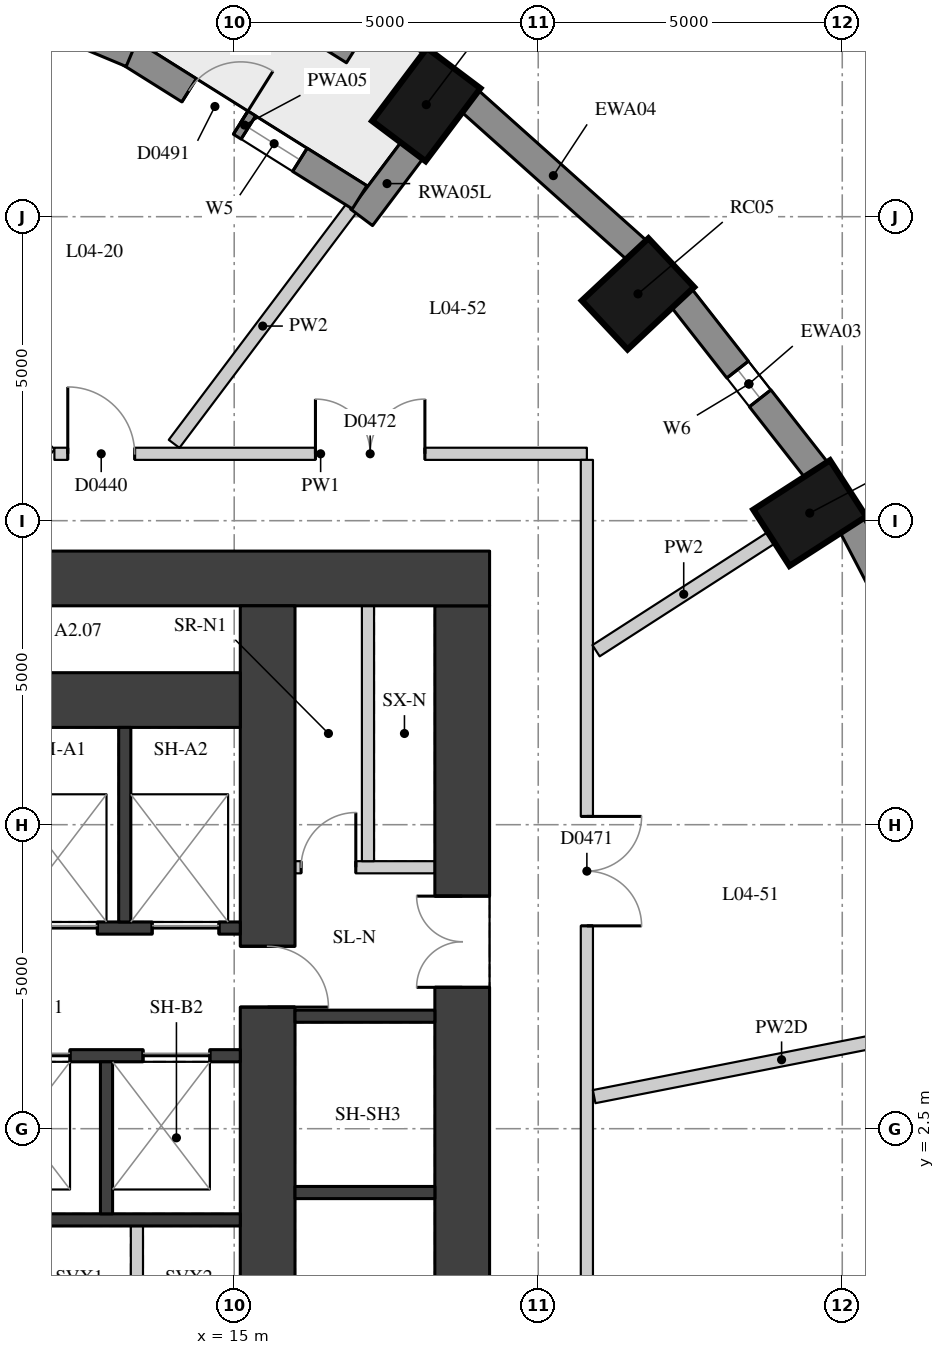
"""IFC4 building model, lengths in metres.
Left out: names, types, materials, properties, quantities, classifications, styles, units other than length and angle.
Written with IfcOpenShell. Run it as: python <this file> out.ifc"""

import sys

from ifc_helpers import new_model, si_unit, direction, frame, frame_2d, origin, origin_2d, place, context, subcontext, project, spatial, rectangle, extrude, element, fill, save


model = new_model("IFC4")
c1 = context("Model", 3, precision=1e-05, world=origin(), true_north=direction((0.0, 1.0)))
c2 = subcontext(c1, "Body", "Model", "MODEL_VIEW")
j1 = project(units=[si_unit("LENGTHUNIT", "METRE"), si_unit("PLANEANGLEUNIT", "RADIAN")], contexts=[c1])
p1 = place(None, origin())
s1 = spatial("IfcSite", under=j1, at=p1, CompositionType="ELEMENT")
p2 = place(p1, origin())
s2 = spatial("IfcBuilding", under=s1, at=p2, CompositionType="ELEMENT")
p3 = place(p2, frame((0.0, 0.0, 21.7)))
s3 = spatial("IfcBuildingStorey", under=s2, at=p3, CompositionType="ELEMENT", Elevation=21.7)
for number, where, z_axis, x_axis in (
    (1, (24.465, 12.625, 0.0), (0.0, 0.0, 1.0), (0.841, 0.541, 0.0)),
    (2, (21.641, 16.23, 0.0), (0.0, 0.0, 1.0), (0.73, 0.683, 0.0)),
    (3, (18.159, 19.343, 0.0), (0.0, 0.0, 1.0), (0.601, 0.799, 0.0)),
):
    element("IfcColumn", number, at=place(p3, frame(where, z_axis=z_axis, x_axis=x_axis)), inside=s3, PredefinedType="COLUMN", context=c2, shape_type="SweptSolid", body=[
        extrude(rectangle(XDim=1.5, YDim=1.1, at=origin_2d()), origin(), (0.0, 0.0, 1.0), 3.3),
    ])
p4 = place(p3, frame((26.786, 9.305, 0.0), z_axis=(0.0, 0.0, 1.0), x_axis=(-0.462492775226, 0.886623050041, 0.0)))
e4 = element("IfcWall", 4, at=p4, inside=s3, PredefinedType="SOLIDWALL", context=c2, shape_type="SweptSolid", body=[
    extrude(rectangle(XDim=3.532, YDim=0.45, at=frame_2d((1.766, 0.0))), origin(), (0.0, 0.0, 1.0), 3.02),
])
p5 = place(p3, frame((24.578, 13.328, 0.0), z_axis=(0.0, 0.0, 1.0), x_axis=(-0.616661975264, 0.787228053529, 0.0)))
e5 = element("IfcWall", 5, at=p5, inside=s3, PredefinedType="SOLIDWALL", context=c2, shape_type="SweptSolid", body=[
    extrude(rectangle(XDim=3.61, YDim=0.45, at=frame_2d((1.805, 0.0))), origin(), (0.0, 0.0, 1.0), 3.02),
])
p6 = place(p5, frame((1.505, 0.0, 0.4)))
e6 = element("IfcOpeningElement", 6, at=p6, cuts=e5, PredefinedType="OPENING", context=c2, shape_type="SweptSolid", body=[
    extrude(rectangle(XDim=0.6, YDim=1.75, at=frame_2d((0.3, 0.875))), frame((0.0, 0.235, 0.0), z_axis=(0.0, -1.0, 0.0), x_axis=(1.0, 0.0, 0.0)), (0.0, 0.0, 1.0), 0.47),
])
p7 = place(p3, frame((21.627, 16.943, 0.0), z_axis=(0.0, 0.0, 1.0), x_axis=(-0.745526233716, 0.66647628228, 0.0)))
e7 = element("IfcWall", 7, at=p7, inside=s3, PredefinedType="SOLIDWALL", context=c2, shape_type="SweptSolid", body=[
    extrude(rectangle(XDim=3.697, YDim=0.45, at=frame_2d((1.848, 0.0))), origin(), (0.0, 0.0, 1.0), 3.02),
])
p8 = place(p3, frame((17.932, 18.6, 0.0), z_axis=(0.0, 0.0, 1.0), x_axis=(-0.601262851241, -0.799051302306, 0.0)))
e8 = element("IfcWall", 8, at=p8, inside=s3, PredefinedType="SOLIDWALL", context=c2, shape_type="SweptSolid", body=[
    extrude(rectangle(XDim=1.391, YDim=0.45, at=frame_2d((0.696, 0.0))), origin(), (0.0, 0.0, 1.0), 3.02),
])
p9 = place(p3, frame((17.062, 17.819, 0.0), z_axis=(0.0, 0.0, 1.0), x_axis=(-0.846990101364, 0.531608660757, 0.0)))
e9 = element("IfcWall", 9, at=p9, inside=s3, PredefinedType="SOLIDWALL", context=c2, shape_type="SweptSolid", body=[
    extrude(rectangle(XDim=4.469, YDim=0.45, at=frame_2d((2.234, 0.0))), origin(), (0.0, 0.0, 1.0), 3.02),
])
p10 = place(p9, frame((1.159, 0.0, 0.4)))
e10 = element("IfcOpeningElement", 10, at=p10, cuts=e9, PredefinedType="OPENING", context=c2, shape_type="SweptSolid", body=[
    extrude(rectangle(XDim=1.0, YDim=1.75, at=frame_2d((0.5, 0.875))), frame((0.0, 0.235, 0.0), z_axis=(0.0, -1.0, 0.0), x_axis=(1.0, 0.0, 0.0)), (0.0, 0.0, 1.0), 0.47),
])
p11 = place(p9, frame((2.31, 0.0, 0.0)))
e11 = element("IfcOpeningElement", 11, at=p11, cuts=e9, PredefinedType="OPENING", context=c2, shape_type="SweptSolid", body=[
    extrude(rectangle(XDim=1.0, YDim=2.15, at=frame_2d((0.5, 1.075))), frame((0.0, 0.235, 0.0), z_axis=(0.0, -1.0, 0.0), x_axis=(1.0, 0.0, 0.0)), (0.0, 0.0, 1.0), 0.47),
])
p12 = place(p3, frame((13.31, 20.178, 0.0), z_axis=(0.0, 0.0, 1.0), x_axis=(-0.922634412489, 0.385675693935, 0.0)))
e12 = element("IfcWall", 12, at=p12, inside=s3, PredefinedType="SOLIDWALL", context=c2, shape_type="SweptSolid", body=[
    extrude(rectangle(XDim=4.577, YDim=0.45, at=frame_2d((2.288, 0.0))), origin(), (0.0, 0.0, 1.0), 3.02),
])
p13 = place(p12, frame((1.213, 0.0, 0.4)))
e13 = element("IfcOpeningElement", 13, at=p13, cuts=e12, PredefinedType="OPENING", context=c2, shape_type="SweptSolid", body=[
    extrude(rectangle(XDim=1.0, YDim=1.75, at=frame_2d((0.5, 0.875))), frame((0.0, 0.235, 0.0), z_axis=(0.0, -1.0, 0.0), x_axis=(1.0, 0.0, 0.0)), (0.0, 0.0, 1.0), 0.47),
])
p14 = place(p12, frame((2.363, 0.0, 0.0)))
e14 = element("IfcOpeningElement", 14, at=p14, cuts=e12, PredefinedType="OPENING", context=c2, shape_type="SweptSolid", body=[
    extrude(rectangle(XDim=1.0, YDim=2.15, at=frame_2d((0.5, 1.075))), frame((0.0, 0.235, 0.0), z_axis=(0.0, -1.0, 0.0), x_axis=(1.0, 0.0, 0.0)), (0.0, 0.0, 1.0), 0.47),
])
p15 = place(p3, frame((17.032, 20.328, 0.0), z_axis=(0.0, 0.0, 1.0), x_axis=(-0.847609446823, 0.530620604252, 0.0)))
e15 = element("IfcWall", 15, at=p15, inside=s3, PredefinedType="USERDEFINED", context=c2, shape_type="SweptSolid", body=[
    extrude(rectangle(XDim=1.8, YDim=0.7, at=frame_2d((0.9, 0.0))), origin(), (0.0, 0.0, 1.0), 0.75),
])
p16 = place(p3, frame((18.75, -11.1, 0.0), z_axis=(0.0, 0.0, 1.0), x_axis=(0.0, 1.0, 0.0)))
e16 = element("IfcWall", 16, at=p16, inside=s3, PredefinedType="SHEAR", context=c2, shape_type="SweptSolid", body=[
    extrude(rectangle(XDim=22.2, YDim=0.9, at=frame_2d((11.1, 0.0))), origin(), (0.0, 0.0, 1.0), 3.02),
])
p17 = place(p16, frame((15.925, 0.0, 0.0)))
e17 = element("IfcOpeningElement", 17, at=p17, cuts=e16, PredefinedType="OPENING", context=c2, shape_type="SweptSolid", body=[
    extrude(rectangle(XDim=1.5, YDim=2.1, at=frame_2d((0.75, 1.05))), frame((0.0, 0.46, 0.0), z_axis=(0.0, -1.0, 0.0), x_axis=(1.0, 0.0, 0.0)), (0.0, 0.0, 1.0), 0.92),
])
p18 = place(p16, frame((4.525, 0.0, 0.0)))
e18 = element("IfcOpeningElement", 18, at=p18, cuts=e16, PredefinedType="OPENING", context=c2, shape_type="SweptSolid", body=[
    extrude(rectangle(XDim=1.5, YDim=2.1, at=frame_2d((0.75, 1.05))), frame((0.0, 0.46, 0.0), z_axis=(0.0, -1.0, 0.0), x_axis=(1.0, 0.0, 0.0)), (0.0, 0.0, 1.0), 0.92),
])
p19 = place(p3, frame((4.0, 11.55, 0.0), z_axis=(0.0, 0.0, 1.0), x_axis=(1.0, 0.0, 0.0)))
e19 = element("IfcWall", 19, at=p19, inside=s3, PredefinedType="SHEAR", context=c2, shape_type="SweptSolid", body=[
    extrude(rectangle(XDim=15.2, YDim=0.9, at=frame_2d((7.6, 0.0))), origin(), (0.0, 0.0, 1.0), 3.02),
])
p20 = place(p3, frame((15.55, -11.1, 0.0), z_axis=(0.0, 0.0, 1.0), x_axis=(0.0, 1.0, 0.0)))
e20 = element("IfcWall", 20, at=p20, inside=s3, PredefinedType="SHEAR", context=c2, shape_type="SweptSolid", body=[
    extrude(rectangle(XDim=22.2, YDim=0.9, at=frame_2d((11.1, 0.0))), origin(), (0.0, 0.0, 1.0), 3.02),
])
p21 = place(p20, frame((15.6, 0.0, 0.0)))
e21 = element("IfcOpeningElement", 21, at=p21, cuts=e20, PredefinedType="OPENING", context=c2, shape_type="SweptSolid", body=[
    extrude(rectangle(XDim=1.0, YDim=2.1, at=frame_2d((0.5, 1.05))), frame((0.0, 0.46, 0.0), z_axis=(0.0, -1.0, 0.0), x_axis=(1.0, 0.0, 0.0)), (0.0, 0.0, 1.0), 0.92),
])
p22 = place(p20, frame((5.6, 0.0, 0.0)))
e22 = element("IfcOpeningElement", 22, at=p22, cuts=e20, PredefinedType="OPENING", context=c2, shape_type="SweptSolid", body=[
    extrude(rectangle(XDim=1.0, YDim=2.1, at=frame_2d((0.5, 1.05))), frame((0.0, 0.46, 0.0), z_axis=(0.0, -1.0, 0.0), x_axis=(1.0, 0.0, 0.0)), (0.0, 0.0, 1.0), 0.92),
])
p23 = place(p3, frame((4.9, 9.55, 0.0), z_axis=(0.0, 0.0, 1.0), x_axis=(1.0, 0.0, 0.0)))
e23 = element("IfcWall", 23, at=p23, inside=s3, PredefinedType="SHEAR", context=c2, shape_type="SweptSolid", body=[
    extrude(rectangle(XDim=10.2, YDim=0.9, at=frame_2d((5.1, 0.0))), origin(), (0.0, 0.0, 1.0), 3.02),
])
p24 = place(p3, frame((4.9, 5.8, 0.0), z_axis=(0.0, 0.0, 1.0), x_axis=(1.0, 0.0, 0.0)))
e24 = element("IfcWall", 24, at=p24, inside=s3, PredefinedType="SHEAR", context=c2, shape_type="SweptSolid", body=[
    extrude(rectangle(XDim=10.2, YDim=0.2, at=frame_2d((5.1, 0.0))), origin(), (0.0, 0.0, 1.0), 3.02),
])
p25 = place(p24, frame((6.75, 0.0, 0.0)))
e25 = element("IfcOpeningElement", 25, at=p25, cuts=e24, PredefinedType="OPENING", context=c2, shape_type="SweptSolid", body=[
    extrude(rectangle(XDim=1.1, YDim=2.1, at=frame_2d((0.55, 1.05))), frame((0.0, 0.11, 0.0), z_axis=(0.0, -1.0, 0.0), x_axis=(1.0, 0.0, 0.0)), (0.0, 0.0, 1.0), 0.22),
])
p26 = place(p24, frame((8.75, 0.0, 0.0)))
e26 = element("IfcOpeningElement", 26, at=p26, cuts=e24, PredefinedType="OPENING", context=c2, shape_type="SweptSolid", body=[
    extrude(rectangle(XDim=1.1, YDim=2.1, at=frame_2d((0.55, 1.05))), frame((0.0, 0.11, 0.0), z_axis=(0.0, -1.0, 0.0), x_axis=(1.0, 0.0, 0.0)), (0.0, 0.0, 1.0), 0.22),
])
p27 = place(p3, frame((4.9, 3.7, 0.0), z_axis=(0.0, 0.0, 1.0), x_axis=(1.0, 0.0, 0.0)))
e27 = element("IfcWall", 27, at=p27, inside=s3, PredefinedType="SHEAR", context=c2, shape_type="SweptSolid", body=[
    extrude(rectangle(XDim=10.2, YDim=0.2, at=frame_2d((5.1, 0.0))), origin(), (0.0, 0.0, 1.0), 3.02),
])
p28 = place(p27, frame((6.3, 0.0, 0.0)))
e28 = element("IfcOpeningElement", 28, at=p28, cuts=e27, PredefinedType="OPENING", context=c2, shape_type="SweptSolid", body=[
    extrude(rectangle(XDim=1.1, YDim=2.1, at=frame_2d((0.55, 1.05))), frame((0.0, 0.11, 0.0), z_axis=(0.0, -1.0, 0.0), x_axis=(1.0, 0.0, 0.0)), (0.0, 0.0, 1.0), 0.22),
])
p29 = place(p27, frame((8.6, 0.0, 0.0)))
e29 = element("IfcOpeningElement", 29, at=p29, cuts=e27, PredefinedType="OPENING", context=c2, shape_type="SweptSolid", body=[
    extrude(rectangle(XDim=1.1, YDim=2.1, at=frame_2d((0.55, 1.05))), frame((0.0, 0.11, 0.0), z_axis=(0.0, -1.0, 0.0), x_axis=(1.0, 0.0, 0.0)), (0.0, 0.0, 1.0), 0.22),
])
p30 = place(p3, frame((4.9, 1.0, 0.0), z_axis=(0.0, 0.0, 1.0), x_axis=(1.0, 0.0, 0.0)))
e30 = element("IfcWall", 30, at=p30, inside=s3, PredefinedType="SHEAR", context=c2, shape_type="SweptSolid", body=[
    extrude(rectangle(XDim=10.2, YDim=0.2, at=frame_2d((5.1, 0.0))), origin(), (0.0, 0.0, 1.0), 3.02),
])
p31 = place(p3, frame((13.2, 5.9, 0.0), z_axis=(0.0, 0.0, 1.0), x_axis=(0.0, 1.0, 0.0)))
e31 = element("IfcWall", 31, at=p31, inside=s3, PredefinedType="SHEAR", context=c2, shape_type="SweptSolid", body=[
    extrude(rectangle(XDim=3.2, YDim=0.2, at=frame_2d((1.6, 0.0))), origin(), (0.0, 0.0, 1.0), 3.02),
])
p32 = place(p3, frame((12.9, 1.1, 0.0), z_axis=(0.0, 0.0, 1.0), x_axis=(0.0, 1.0, 0.0)))
e32 = element("IfcWall", 32, at=p32, inside=s3, PredefinedType="SHEAR", context=c2, shape_type="SweptSolid", body=[
    extrude(rectangle(XDim=2.5, YDim=0.2, at=frame_2d((1.25, 0.0))), origin(), (0.0, 0.0, 1.0), 3.02),
])
p33 = place(p3, frame((13.4, -0.9, 0.0), z_axis=(0.0, 0.0, 1.0), x_axis=(0.0, 1.0, 0.0)))
e33 = element("IfcWall", 33, at=p33, inside=s3, PredefinedType="PARTITIONING", context=c2, shape_type="SweptSolid", body=[
    extrude(rectangle(XDim=1.8, YDim=0.2, at=frame_2d((0.9, 0.0))), origin(), (0.0, 0.0, 1.0), 3.02),
])
for number, where, z_axis, x_axis in (
    (34, (16.0, 1.45, 0.0), (0.0, 0.0, 1.0), (1.0, 0.0, 0.0)),
    (35, (16.0, 4.35, 0.0), (0.0, 0.0, 1.0), (1.0, 0.0, 0.0)),
):
    element("IfcWall", number, at=place(p3, frame(where, z_axis=z_axis, x_axis=x_axis)), inside=s3, PredefinedType="SHEAR", context=c2, shape_type="SweptSolid", body=[
        extrude(rectangle(XDim=2.3, YDim=0.2, at=frame_2d((1.15, 0.0))), origin(), (0.0, 0.0, 1.0), 3.02),
    ])
p34 = place(p3, frame((16.0, 6.8, 0.0), z_axis=(0.0, 0.0, 1.0), x_axis=(1.0, 0.0, 0.0)))
e36 = element("IfcWall", 36, at=p34, inside=s3, PredefinedType="PARTITIONING", context=c2, shape_type="SweptSolid", body=[
    extrude(rectangle(XDim=2.3, YDim=0.2, at=frame_2d((1.15, 0.0))), origin(), (0.0, 0.0, 1.0), 3.02),
])
p35 = place(p34, frame((0.1, 0.0, 0.0)))
e37 = element("IfcOpeningElement", 37, at=p35, cuts=e36, PredefinedType="OPENING", context=c2, shape_type="SweptSolid", body=[
    extrude(rectangle(XDim=0.9, YDim=2.1, at=frame_2d((0.45, 1.05))), frame((0.0, 0.11, 0.0), z_axis=(0.0, -1.0, 0.0), x_axis=(1.0, 0.0, 0.0)), (0.0, 0.0, 1.0), 0.22),
])
p36 = place(p3, frame((17.2, 6.9, 0.0), z_axis=(0.0, 0.0, 1.0), x_axis=(0.0, 1.0, 0.0)))
e38 = element("IfcWall", 38, at=p36, inside=s3, PredefinedType="PARTITIONING", context=c2, shape_type="SweptSolid", body=[
    extrude(rectangle(XDim=4.2, YDim=0.2, at=frame_2d((2.1, 0.0))), origin(), (0.0, 0.0, 1.0), 3.02),
])
p37 = place(p3, frame((10.576, 14.853, 0.0), z_axis=(0.0, 0.0, 1.0), x_axis=(0.746758163178, -0.665095666597, 0.0)))
e39 = element("IfcWall", 39, at=p37, inside=s3, PredefinedType="PARTITIONING", context=c2, shape_type="SweptSolid", body=[
    extrude(rectangle(XDim=1.884, YDim=0.2, at=frame_2d((0.942, 0.0))), origin(), (0.0, 0.0, 1.0), 3.02),
])
p38 = place(p3, frame((12.043, 13.6, 0.0), z_axis=(0.0, 0.0, 1.0), x_axis=(1.0, 0.0, 0.0)))
e40 = element("IfcWall", 40, at=p38, inside=s3, PredefinedType="PARTITIONING", context=c2, shape_type="SweptSolid", body=[
    extrude(rectangle(XDim=8.757, YDim=0.2, at=frame_2d((4.378, 0.0))), origin(), (0.0, 0.0, 1.0), 3.02),
])
p39 = place(p38, frame((0.22, 0.0, 0.0)))
e41 = element("IfcOpeningElement", 41, at=p39, cuts=e40, PredefinedType="OPENING", context=c2, shape_type="SweptSolid", body=[
    extrude(rectangle(XDim=1.1, YDim=2.1, at=frame_2d((0.55, 1.05))), frame((0.0, 0.11, 0.0), z_axis=(0.0, -1.0, 0.0), x_axis=(1.0, 0.0, 0.0)), (0.0, 0.0, 1.0), 0.22),
])
p40 = place(p38, frame((4.293, 0.0, 0.0)))
e42 = element("IfcOpeningElement", 42, at=p40, cuts=e40, PredefinedType="OPENING", context=c2, shape_type="SweptSolid", body=[
    extrude(rectangle(XDim=1.8, YDim=2.1, at=frame_2d((0.9, 1.05))), frame((0.0, 0.11, 0.0), z_axis=(0.0, -1.0, 0.0), x_axis=(1.0, 0.0, 0.0)), (0.0, 0.0, 1.0), 0.22),
])
p41 = place(p3, frame((20.8, 13.5, 0.0), z_axis=(0.0, 0.0, 1.0), x_axis=(0.0, -1.0, 0.0)))
e43 = element("IfcWall", 43, at=p41, inside=s3, PredefinedType="PARTITIONING", context=c2, shape_type="SweptSolid", body=[
    extrude(rectangle(XDim=27.1, YDim=0.2, at=frame_2d((13.55, 0.0))), origin(), (0.0, 0.0, 1.0), 3.02),
])
p42 = place(p41, frame((14.149, 0.0, 0.0)))
e44 = element("IfcOpeningElement", 44, at=p42, cuts=e43, PredefinedType="OPENING", context=c2, shape_type="SweptSolid", body=[
    extrude(rectangle(XDim=1.8, YDim=2.1, at=frame_2d((0.9, 1.05))), frame((0.0, 0.11, 0.0), z_axis=(0.0, -1.0, 0.0), x_axis=(1.0, 0.0, 0.0)), (0.0, 0.0, 1.0), 0.22),
])
p43 = place(p41, frame((5.864, 0.0, 0.0)))
e45 = element("IfcOpeningElement", 45, at=p43, cuts=e43, PredefinedType="OPENING", context=c2, shape_type="SweptSolid", body=[
    extrude(rectangle(XDim=1.8, YDim=2.1, at=frame_2d((0.9, 1.05))), frame((0.0, 0.11, 0.0), z_axis=(0.0, -1.0, 0.0), x_axis=(1.0, 0.0, 0.0)), (0.0, 0.0, 1.0), 0.22),
])
p44 = place(p3, frame((27.085, 4.24, 0.0), z_axis=(0.0, 0.0, 1.0), x_axis=(-0.981207724218, -0.192954403772, 0.0)))
e46 = element("IfcWall", 46, at=p44, inside=s3, PredefinedType="PARTITIONING", context=c2, shape_type="SweptSolid", body=[
    extrude(rectangle(XDim=6.283, YDim=0.22, at=frame_2d((3.142, 0.0))), origin(), (0.0, 0.0, 1.0), 2.47),
])
p45 = place(p3, frame((23.835, 12.219, 0.0), z_axis=(0.0, 0.0, 1.0), x_axis=(-0.840694872373, -0.541509124176, 0.0)))
e47 = element("IfcWall", 47, at=p45, inside=s3, PredefinedType="PARTITIONING", context=c2, shape_type="SweptSolid", body=[
    extrude(rectangle(XDim=3.43, YDim=0.22, at=frame_2d((1.715, 0.0))), origin(), (0.0, 0.0, 1.0), 3.02),
])
p46 = place(p3, frame((16.927, 17.638, 0.0), z_axis=(0.0, 0.0, 1.0), x_axis=(-0.601183583641, -0.799110942711, 0.0)))
e48 = element("IfcWall", 48, at=p46, inside=s3, PredefinedType="PARTITIONING", context=c2, shape_type="SweptSolid", body=[
    extrude(rectangle(XDim=4.849, YDim=0.22, at=frame_2d((2.424, 0.0))), origin(), (0.0, 0.0, 1.0), 3.02),
])
p47 = place(p6, origin())
e49 = element("IfcWindow", 49, at=p47, inside=s3, PartitioningType="SINGLE_PANEL", PredefinedType="WINDOW", context=c2, shape_type="SweptSolid", body=[
    extrude(rectangle(XDim=0.6, YDim=1.75, at=frame_2d((0.3, 0.875))), frame((0.0, 0.035, 0.0), z_axis=(0.0, -1.0, 0.0), x_axis=(1.0, 0.0, 0.0)), (0.0, 0.0, 1.0), 0.06),
])
fill(e6, e49)
p48 = place(p10, origin())
e50 = element("IfcWindow", 50, at=p48, inside=s3, PartitioningType="SINGLE_PANEL", PredefinedType="WINDOW", context=c2, shape_type="SweptSolid", body=[
    extrude(rectangle(XDim=1.0, YDim=1.75, at=frame_2d((0.5, 0.875))), frame((0.0, 0.035, 0.0), z_axis=(0.0, -1.0, 0.0), x_axis=(1.0, 0.0, 0.0)), (0.0, 0.0, 1.0), 0.06),
])
fill(e10, e50)
p49 = place(p11, frame((1.0, 0.0, 0.0), z_axis=(0.0, 0.0, 1.0), x_axis=(-1.0, 0.0, 0.0)))
e51 = element("IfcDoor", 51, at=p49, inside=s3, OperationType="SINGLE_SWING_RIGHT", PredefinedType="DOOR", context=c2, shape_type="SweptSolid", body=[
    extrude(rectangle(XDim=1.0, YDim=2.15, at=frame_2d((0.5, 1.075))), frame((0.0, 0.075, 0.0), z_axis=(0.0, -1.0, 0.0), x_axis=(1.0, 0.0, 0.0)), (0.0, 0.0, 1.0), 0.05),
])
fill(e11, e51)
p50 = place(p17, origin())
e52 = element("IfcDoor", 52, at=p50, inside=s3, OperationType="DOUBLE_DOOR_SINGLE_SWING", PredefinedType="DOOR", context=c2, shape_type="SweptSolid", body=[
    extrude(rectangle(XDim=1.5, YDim=2.1, at=frame_2d((0.75, 1.05))), frame((0.0, 0.025, 0.0), z_axis=(0.0, -1.0, 0.0), x_axis=(1.0, 0.0, 0.0)), (0.0, 0.0, 1.0), 0.05),
])
fill(e17, e52)
p51 = place(p25, origin())
e53 = element("IfcDoor", 53, at=p51, inside=s3, OperationType="DOUBLE_DOOR_SLIDING", PredefinedType="DOOR", context=c2, shape_type="SweptSolid", body=[
    extrude(rectangle(XDim=1.1, YDim=2.1, at=frame_2d((0.55, 1.05))), frame((0.0, 0.025, 0.0), z_axis=(0.0, -1.0, 0.0), x_axis=(1.0, 0.0, 0.0)), (0.0, 0.0, 1.0), 0.05),
])
fill(e25, e53)
p52 = place(p26, origin())
e54 = element("IfcDoor", 54, at=p52, inside=s3, OperationType="DOUBLE_DOOR_SLIDING", PredefinedType="DOOR", context=c2, shape_type="SweptSolid", body=[
    extrude(rectangle(XDim=1.1, YDim=2.1, at=frame_2d((0.55, 1.05))), frame((0.0, 0.025, 0.0), z_axis=(0.0, -1.0, 0.0), x_axis=(1.0, 0.0, 0.0)), (0.0, 0.0, 1.0), 0.05),
])
fill(e26, e54)
p53 = place(p28, origin())
e55 = element("IfcDoor", 55, at=p53, inside=s3, OperationType="DOUBLE_DOOR_SLIDING", PredefinedType="DOOR", context=c2, shape_type="SweptSolid", body=[
    extrude(rectangle(XDim=1.1, YDim=2.1, at=frame_2d((0.55, 1.05))), frame((0.0, 0.025, 0.0), z_axis=(0.0, -1.0, 0.0), x_axis=(1.0, 0.0, 0.0)), (0.0, 0.0, 1.0), 0.05),
])
fill(e28, e55)
p54 = place(p29, origin())
e56 = element("IfcDoor", 56, at=p54, inside=s3, OperationType="DOUBLE_DOOR_SLIDING", PredefinedType="DOOR", context=c2, shape_type="SweptSolid", body=[
    extrude(rectangle(XDim=1.1, YDim=2.1, at=frame_2d((0.55, 1.05))), frame((0.0, 0.025, 0.0), z_axis=(0.0, -1.0, 0.0), x_axis=(1.0, 0.0, 0.0)), (0.0, 0.0, 1.0), 0.05),
])
fill(e29, e56)
p55 = place(p21, origin())
e57 = element("IfcDoor", 57, at=p55, inside=s3, OperationType="SINGLE_SWING_RIGHT", PredefinedType="DOOR", context=c2, shape_type="SweptSolid", body=[
    extrude(rectangle(XDim=1.0, YDim=2.1, at=frame_2d((0.5, 1.05))), frame((0.0, 0.025, 0.0), z_axis=(0.0, -1.0, 0.0), x_axis=(1.0, 0.0, 0.0)), (0.0, 0.0, 1.0), 0.05),
])
fill(e21, e57)
p56 = place(p35, origin())
e58 = element("IfcDoor", 58, at=p56, inside=s3, OperationType="SINGLE_SWING_RIGHT", PredefinedType="DOOR", context=c2, shape_type="SweptSolid", body=[
    extrude(rectangle(XDim=0.9, YDim=2.1, at=frame_2d((0.45, 1.05))), frame((0.0, 0.025, 0.0), z_axis=(0.0, -1.0, 0.0), x_axis=(1.0, 0.0, 0.0)), (0.0, 0.0, 1.0), 0.05),
])
fill(e37, e58)
p57 = place(p39, origin())
e59 = element("IfcDoor", 59, at=p57, inside=s3, OperationType="SINGLE_SWING_LEFT", PredefinedType="DOOR", context=c2, shape_type="SweptSolid", body=[
    extrude(rectangle(XDim=1.1, YDim=2.1, at=frame_2d((0.55, 1.05))), frame((0.0, 0.025, 0.0), z_axis=(0.0, -1.0, 0.0), x_axis=(1.0, 0.0, 0.0)), (0.0, 0.0, 1.0), 0.05),
])
fill(e41, e59)
p58 = place(p43, origin())
e60 = element("IfcDoor", 60, at=p58, inside=s3, OperationType="DOUBLE_DOOR_SINGLE_SWING", PredefinedType="DOOR", context=c2, shape_type="SweptSolid", body=[
    extrude(rectangle(XDim=1.8, YDim=2.1, at=frame_2d((0.9, 1.05))), frame((0.0, 0.025, 0.0), z_axis=(0.0, -1.0, 0.0), x_axis=(1.0, 0.0, 0.0)), (0.0, 0.0, 1.0), 0.05),
])
fill(e45, e60)
p59 = place(p40, origin())
e61 = element("IfcDoor", 61, at=p59, inside=s3, OperationType="DOUBLE_DOOR_SINGLE_SWING", PredefinedType="DOOR", context=c2, shape_type="SweptSolid", body=[
    extrude(rectangle(XDim=1.8, YDim=2.1, at=frame_2d((0.9, 1.05))), frame((0.0, 0.025, 0.0), z_axis=(0.0, -1.0, 0.0), x_axis=(1.0, 0.0, 0.0)), (0.0, 0.0, 1.0), 0.05),
])
fill(e42, e61)
save(model, sys.argv[1])
